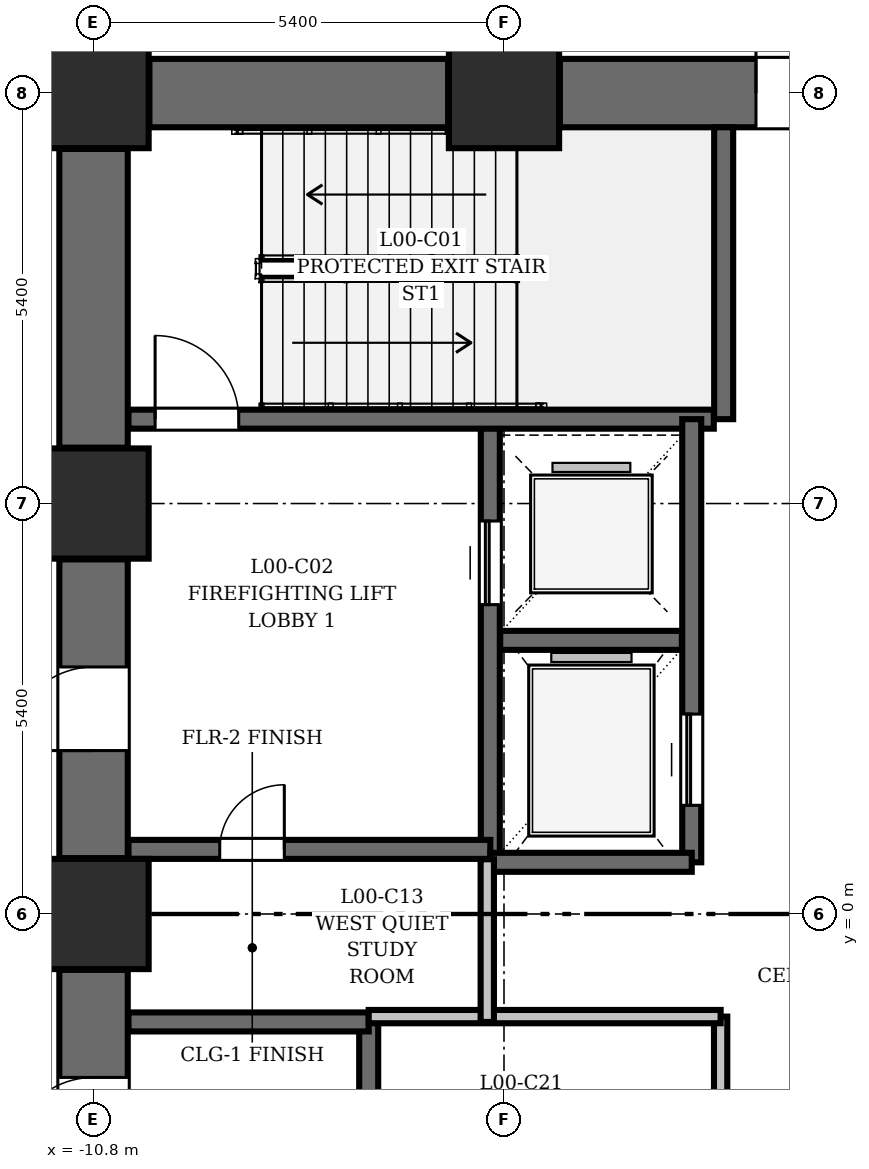
"""IFC4 building model, lengths in metres.
Left out: names, types, materials, properties, quantities, classifications, styles, units other than length and angle.
Written with IfcOpenShell. Run it as: python <this file> out.ifc"""

import sys

from ifc_helpers import new_model, si_unit, direction, frame, frame_2d, origin, origin_2d, place, context, subcontext, project, spatial, rectangle, extrude, element, fill, save


model = new_model("IFC4")
c1 = context("Model", 3, precision=1e-05, world=origin(), true_north=direction((0.0, 1.0)))
c2 = subcontext(c1, "Body", "Model", "MODEL_VIEW")
j1 = project(units=[si_unit("LENGTHUNIT", "METRE"), si_unit("PLANEANGLEUNIT", "RADIAN")], contexts=[c1])
p1 = place(None, origin())
s1 = spatial("IfcSite", under=j1, at=p1, CompositionType="ELEMENT")
p2 = place(p1, origin())
s2 = spatial("IfcBuilding", under=s1, at=p2, CompositionType="ELEMENT")
p3 = place(p2, origin())
s3 = spatial("IfcBuildingStorey", under=s2, at=p3, CompositionType="ELEMENT", Elevation=0.0)
for number, where, z_axis, x_axis in (
    (1, (-10.8, 0.0, 0.0), (0.0, 0.0, 1.0), (1.0, 0.0, 0.0)),
    (2, (-10.8, 5.4, 0.0), (0.0, 0.0, 1.0), (1.0, 0.0, 0.0)),
    (3, (-10.8, 10.8, 0.0), (0.0, 0.0, 1.0), (1.0, 0.0, 0.0)),
    (4, (-5.4, 10.8, 0.0), (0.0, 0.0, 1.0), (1.0, 0.0, 0.0)),
):
    element("IfcColumn", number, at=place(p3, frame(where, z_axis=z_axis, x_axis=x_axis)), inside=s3, PredefinedType="COLUMN", context=c2, shape_type="SweptSolid", body=[
        extrude(rectangle(XDim=1.45, YDim=1.45, at=origin_2d()), origin(), (0.0, 0.0, 1.0), 4.5),
    ])
p4 = place(p3, frame((-10.065, 10.8, 0.0), z_axis=(0.0, 0.0, 1.0), x_axis=(1.0, 0.0, 0.0)))
e5 = element("IfcWall", 5, at=p4, inside=s3, PredefinedType="SHEAR", context=c2, shape_type="SweptSolid", body=[
    extrude(rectangle(XDim=3.93, YDim=0.9, at=frame_2d((1.965, 0.0))), origin(), (0.0, 0.0, 1.0), 4.5),
])
p5 = place(p3, frame((-4.665, 10.8, 0.0), z_axis=(0.0, 0.0, 1.0), x_axis=(1.0, 0.0, 0.0)))
e6 = element("IfcWall", 6, at=p5, inside=s3, PredefinedType="SHEAR", context=c2, shape_type="SweptSolid", body=[
    extrude(rectangle(XDim=3.93, YDim=0.9, at=frame_2d((1.965, 0.0))), origin(), (0.0, 0.0, 1.0), 4.5),
])
p6 = place(p5, frame((2.58, 0.0, 0.0)))
e7 = element("IfcOpeningElement", 7, at=p6, cuts=e6, PredefinedType="OPENING", context=c2, shape_type="SweptSolid", body=[
    extrude(rectangle(XDim=1.1, YDim=2.1, at=frame_2d((0.55, 1.05))), frame((0.0, 0.46, 0.0), z_axis=(0.0, -1.0, 0.0), x_axis=(1.0, 0.0, 0.0)), (0.0, 0.0, 1.0), 0.92),
])
p7 = place(p3, frame((-10.8, -4.665, 0.0), z_axis=(0.0, 0.0, 1.0), x_axis=(0.0, 1.0, 0.0)))
e8 = element("IfcWall", 8, at=p7, inside=s3, PredefinedType="SHEAR", context=c2, shape_type="SweptSolid", body=[
    extrude(rectangle(XDim=3.93, YDim=0.9, at=frame_2d((1.965, 0.0))), origin(), (0.0, 0.0, 1.0), 4.5),
])
p8 = place(p7, frame((1.415, 0.0, 0.0)))
e9 = element("IfcOpeningElement", 9, at=p8, cuts=e8, PredefinedType="OPENING", context=c2, shape_type="SweptSolid", body=[
    extrude(rectangle(XDim=1.1, YDim=2.1, at=frame_2d((0.55, 1.05))), frame((0.0, 0.46, 0.0), z_axis=(0.0, -1.0, 0.0), x_axis=(1.0, 0.0, 0.0)), (0.0, 0.0, 1.0), 0.92),
])
p9 = place(p3, frame((-10.8, 0.735, 0.0), z_axis=(0.0, 0.0, 1.0), x_axis=(0.0, 1.0, 0.0)))
e10 = element("IfcWall", 10, at=p9, inside=s3, PredefinedType="SHEAR", context=c2, shape_type="SweptSolid", body=[
    extrude(rectangle(XDim=3.93, YDim=0.9, at=frame_2d((1.965, 0.0))), origin(), (0.0, 0.0, 1.0), 4.5),
])
p10 = place(p9, frame((1.415, 0.0, 0.0)))
e11 = element("IfcOpeningElement", 11, at=p10, cuts=e10, PredefinedType="OPENING", context=c2, shape_type="SweptSolid", body=[
    extrude(rectangle(XDim=1.1, YDim=2.1, at=frame_2d((0.55, 1.05))), frame((0.0, 0.46, 0.0), z_axis=(0.0, -1.0, 0.0), x_axis=(1.0, 0.0, 0.0)), (0.0, 0.0, 1.0), 0.92),
])
p11 = place(p3, frame((-10.8, 6.135, 0.0), z_axis=(0.0, 0.0, 1.0), x_axis=(0.0, 1.0, 0.0)))
e12 = element("IfcWall", 12, at=p11, inside=s3, PredefinedType="SHEAR", context=c2, shape_type="SweptSolid", body=[
    extrude(rectangle(XDim=3.93, YDim=0.9, at=frame_2d((1.965, 0.0))), origin(), (0.0, 0.0, 1.0), 4.5),
])
p12 = place(p3, frame((-5.58, 0.72, 0.0), z_axis=(0.0, 0.0, 1.0), x_axis=(0.0, 1.0, 0.0)))
e13 = element("IfcWall", 13, at=p12, inside=s3, PredefinedType="SHEAR", context=c2, shape_type="SweptSolid", body=[
    extrude(rectangle(XDim=5.79, YDim=0.25, at=frame_2d((2.895, 0.0))), origin(), (0.0, 0.0, 1.0), 4.5),
])
p13 = place(p12, frame((3.35, 0.0, 0.0)))
e14 = element("IfcOpeningElement", 14, at=p13, cuts=e13, PredefinedType="OPENING", context=c2, shape_type="SweptSolid", body=[
    extrude(rectangle(XDim=1.1, YDim=2.1, at=frame_2d((0.55, 1.05))), frame((0.0, 0.135, 0.0), z_axis=(0.0, -1.0, 0.0), x_axis=(1.0, 0.0, 0.0)), (0.0, 0.0, 1.0), 0.27),
])
p14 = place(p3, frame((-10.34, 0.85, 0.0), z_axis=(0.0, 0.0, 1.0), x_axis=(1.0, 0.0, 0.0)))
e15 = element("IfcWall", 15, at=p14, inside=s3, PredefinedType="SHEAR", context=c2, shape_type="SweptSolid", body=[
    extrude(rectangle(XDim=4.76, YDim=0.25, at=frame_2d((2.38, 0.0))), origin(), (0.0, 0.0, 1.0), 4.5),
])
p15 = place(p14, frame((1.2, 0.0, 0.0)))
e16 = element("IfcOpeningElement", 16, at=p15, cuts=e15, PredefinedType="OPENING", context=c2, shape_type="SweptSolid", body=[
    extrude(rectangle(XDim=0.85, YDim=2.1, at=frame_2d((0.425, 1.05))), frame((0.0, 0.135, 0.0), z_axis=(0.0, -1.0, 0.0), x_axis=(1.0, 0.0, 0.0)), (0.0, 0.0, 1.0), 0.27),
])
p16 = place(p3, frame((-2.51, 6.51, 0.0), z_axis=(0.0, 0.0, 1.0), x_axis=(0.0, 1.0, 0.0)))
e17 = element("IfcWall", 17, at=p16, inside=s3, PredefinedType="SHEAR", context=c2, shape_type="SweptSolid", body=[
    extrude(rectangle(XDim=3.84, YDim=0.25, at=frame_2d((1.92, 0.0))), origin(), (0.0, 0.0, 1.0), 4.5),
])
p17 = place(p3, frame((-10.34, 6.51, 0.0), z_axis=(0.0, 0.0, 1.0), x_axis=(1.0, 0.0, 0.0)))
e18 = element("IfcWall", 18, at=p17, inside=s3, PredefinedType="SHEAR", context=c2, shape_type="SweptSolid", body=[
    extrude(rectangle(XDim=7.7, YDim=0.25, at=frame_2d((3.85, 0.0))), origin(), (0.0, 0.0, 1.0), 4.5),
])
p18 = place(p17, frame((0.35, 0.0, 0.0)))
e19 = element("IfcOpeningElement", 19, at=p18, cuts=e18, PredefinedType="OPENING", context=c2, shape_type="SweptSolid", body=[
    extrude(rectangle(XDim=1.1, YDim=2.1, at=frame_2d((0.55, 1.05))), frame((0.0, 0.135, 0.0), z_axis=(0.0, -1.0, 0.0), x_axis=(1.0, 0.0, 0.0)), (0.0, 0.0, 1.0), 0.27),
])
p19 = place(p3, frame((-7.18, -6.51, 0.0), z_axis=(0.0, 0.0, 1.0), x_axis=(0.0, 1.0, 0.0)))
e20 = element("IfcWall", 20, at=p19, inside=s3, PredefinedType="SHEAR", context=c2, shape_type="SweptSolid", body=[
    extrude(rectangle(XDim=5.09, YDim=0.25, at=frame_2d((2.545, 0.0))), origin(), (0.0, 0.0, 1.0), 4.5),
])
p20 = place(p3, frame((-10.34, -1.42, 0.0), z_axis=(0.0, 0.0, 1.0), x_axis=(1.0, 0.0, 0.0)))
e21 = element("IfcWall", 21, at=p20, inside=s3, PredefinedType="SHEAR", context=c2, shape_type="SweptSolid", body=[
    extrude(rectangle(XDim=3.16, YDim=0.25, at=frame_2d((1.58, 0.0))), origin(), (0.0, 0.0, 1.0), 4.5),
])
p21 = place(p3, frame((-2.93, 0.68, 0.0), z_axis=(0.0, 0.0, 1.0), x_axis=(0.0, 1.0, 0.0)))
e22 = element("IfcWall", 22, at=p21, inside=s3, PredefinedType="SHEAR", context=c2, shape_type="SweptSolid", body=[
    extrude(rectangle(XDim=5.83, YDim=0.25, at=frame_2d((2.915, 0.0))), origin(), (0.0, 0.0, 1.0), 4.5),
])
p22 = place(p21, frame((0.75, 0.0, 0.0)))
e23 = element("IfcOpeningElement", 23, at=p22, cuts=e22, PredefinedType="OPENING", context=c2, shape_type="SweptSolid", body=[
    extrude(rectangle(XDim=1.2, YDim=2.1, at=frame_2d((0.6, 1.05))), frame((0.0, 0.135, 0.0), z_axis=(0.0, -1.0, 0.0), x_axis=(1.0, 0.0, 0.0)), (0.0, 0.0, 1.0), 0.27),
])
p23 = place(p3, frame((-5.45, 3.6, 0.0), z_axis=(0.0, 0.0, 1.0), x_axis=(1.0, 0.0, 0.0)))
e24 = element("IfcWall", 24, at=p23, inside=s3, PredefinedType="SHEAR", context=c2, shape_type="SweptSolid", body=[
    extrude(rectangle(XDim=2.39, YDim=0.25, at=frame_2d((1.195, 0.0))), origin(), (0.0, 0.0, 1.0), 4.5),
])
p24 = place(p3, frame((-5.58, 0.68, 0.0), z_axis=(0.0, 0.0, 1.0), x_axis=(1.0, 0.0, 0.0)))
e25 = element("IfcWall", 25, at=p24, inside=s3, PredefinedType="SHEAR", context=c2, shape_type="SweptSolid", body=[
    extrude(rectangle(XDim=2.65, YDim=0.25, at=frame_2d((1.325, 0.0))), origin(), (0.0, 0.0, 1.0), 4.5),
])
p25 = place(p3, frame((-2.55, -6.51, 0.0), z_axis=(0.0, 0.0, 1.0), x_axis=(0.0, 1.0, 0.0)))
e26 = element("IfcWall", 26, at=p25, inside=s3, PredefinedType="PARTITIONING", context=c2, shape_type="SweptSolid", body=[
    extrude(rectangle(XDim=5.16, YDim=0.175, at=frame_2d((2.58, 0.0))), origin(), (0.0, 0.0, 1.0), 4.2),
])
p26 = place(p25, frame((3.3, 0.0, 0.0)))
e27 = element("IfcOpeningElement", 27, at=p26, cuts=e26, PredefinedType="OPENING", context=c2, shape_type="SweptSolid", body=[
    extrude(rectangle(XDim=0.85, YDim=2.1, at=frame_2d((0.425, 1.05))), frame((0.0, 0.097, 0.0), z_axis=(0.0, -1.0, 0.0), x_axis=(1.0, 0.0, 0.0)), (0.0, 0.0, 1.0), 0.195),
])
p27 = place(p3, frame((-7.18, -1.35, 0.0), z_axis=(0.0, 0.0, 1.0), x_axis=(1.0, 0.0, 0.0)))
e28 = element("IfcWall", 28, at=p27, inside=s3, PredefinedType="PARTITIONING", context=c2, shape_type="SweptSolid", body=[
    extrude(rectangle(XDim=4.63, YDim=0.175, at=frame_2d((2.315, 0.0))), origin(), (0.0, 0.0, 1.0), 4.2),
])
p28 = place(p3, frame((-5.62, -1.42, 0.0), z_axis=(0.0, 0.0, 1.0), x_axis=(0.0, 1.0, 0.0)))
e29 = element("IfcWall", 29, at=p28, inside=s3, PredefinedType="PARTITIONING", context=c2, shape_type="SweptSolid", body=[
    extrude(rectangle(XDim=2.14, YDim=0.175, at=frame_2d((1.07, 0.0))), origin(), (0.0, 0.0, 1.0), 4.2),
])
p29 = place(p18, origin())
e30 = element("IfcDoor", 30, at=p29, inside=s3, OperationType="SINGLE_SWING_LEFT", PredefinedType="DOOR", context=c2, shape_type="SweptSolid", body=[
    extrude(rectangle(XDim=1.1, YDim=2.1, at=frame_2d((0.55, 1.05))), frame((0.0, 0.025, 0.0), z_axis=(0.0, -1.0, 0.0), x_axis=(1.0, 0.0, 0.0)), (0.0, 0.0, 1.0), 0.05),
])
fill(e19, e30)
p30 = place(p6, origin())
e31 = element("IfcDoor", 31, at=p30, inside=s3, OperationType="SINGLE_SWING_LEFT", PredefinedType="DOOR", context=c2, shape_type="SweptSolid", body=[
    extrude(rectangle(XDim=1.1, YDim=2.1, at=frame_2d((0.55, 1.05))), frame((0.0, 0.025, 0.0), z_axis=(0.0, -1.0, 0.0), x_axis=(1.0, 0.0, 0.0)), (0.0, 0.0, 1.0), 0.05),
])
fill(e7, e31)
p31 = place(p10, origin())
e32 = element("IfcDoor", 32, at=p31, inside=s3, OperationType="SINGLE_SWING_LEFT", PredefinedType="DOOR", context=c2, shape_type="SweptSolid", body=[
    extrude(rectangle(XDim=1.1, YDim=2.1, at=frame_2d((0.55, 1.05))), frame((0.0, 0.025, 0.0), z_axis=(0.0, -1.0, 0.0), x_axis=(1.0, 0.0, 0.0)), (0.0, 0.0, 1.0), 0.05),
])
fill(e11, e32)
p32 = place(p8, origin())
e33 = element("IfcDoor", 33, at=p32, inside=s3, OperationType="SINGLE_SWING_LEFT", PredefinedType="DOOR", context=c2, shape_type="SweptSolid", body=[
    extrude(rectangle(XDim=1.1, YDim=2.1, at=frame_2d((0.55, 1.05))), frame((0.0, 0.025, 0.0), z_axis=(0.0, -1.0, 0.0), x_axis=(1.0, 0.0, 0.0)), (0.0, 0.0, 1.0), 0.05),
])
fill(e9, e33)
p33 = place(p15, origin())
e34 = element("IfcDoor", 34, at=p33, inside=s3, OperationType="SINGLE_SWING_RIGHT", PredefinedType="DOOR", context=c2, shape_type="SweptSolid", body=[
    extrude(rectangle(XDim=0.85, YDim=2.1, at=frame_2d((0.425, 1.05))), frame((0.0, 0.025, 0.0), z_axis=(0.0, -1.0, 0.0), x_axis=(1.0, 0.0, 0.0)), (0.0, 0.0, 1.0), 0.05),
])
fill(e16, e34)
p34 = place(p13, origin())
e35 = element("IfcDoor", 35, at=p34, inside=s3, OperationType="SLIDING_TO_LEFT", PredefinedType="DOOR", context=c2, shape_type="SweptSolid", body=[
    extrude(rectangle(XDim=1.1, YDim=2.1, at=frame_2d((0.55, 1.05))), frame((0.0, 0.025, 0.0), z_axis=(0.0, -1.0, 0.0), x_axis=(1.0, 0.0, 0.0)), (0.0, 0.0, 1.0), 0.05),
])
fill(e14, e35)
p35 = place(p22, origin())
e36 = element("IfcDoor", 36, at=p35, inside=s3, OperationType="SLIDING_TO_LEFT", PredefinedType="DOOR", context=c2, shape_type="SweptSolid", body=[
    extrude(rectangle(XDim=1.2, YDim=2.1, at=frame_2d((0.6, 1.05))), frame((0.0, 0.025, 0.0), z_axis=(0.0, -1.0, 0.0), x_axis=(1.0, 0.0, 0.0)), (0.0, 0.0, 1.0), 0.05),
])
fill(e23, e36)
save(model, sys.argv[1])
